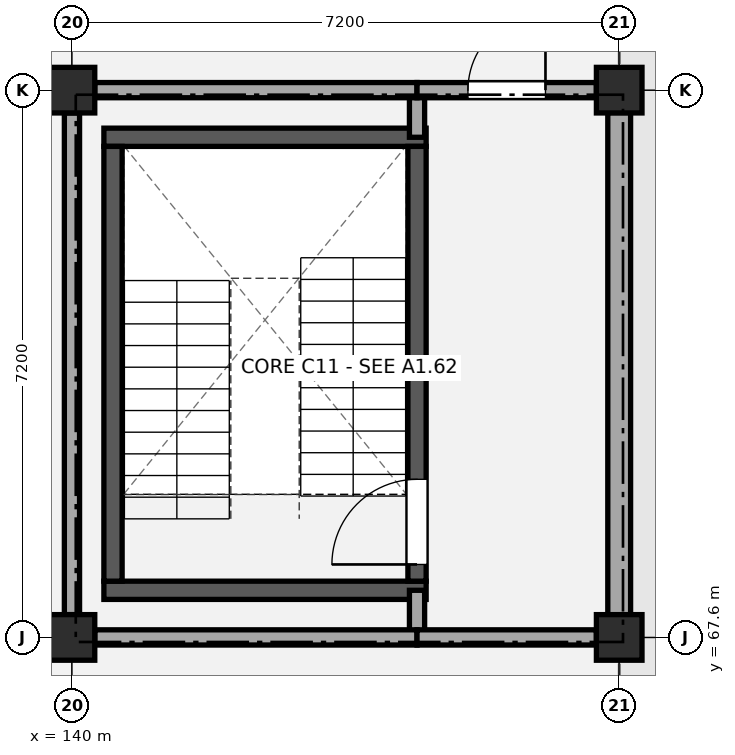
"""IFC4 building model, lengths in metres.
Left out: names, types, materials, properties, quantities, classifications, styles, units other than length and angle.
Written with IfcOpenShell. Run it as: python <this file> out.ifc"""

import sys

from ifc_helpers import new_model, si_unit, direction, frame, frame_2d, origin, origin_2d, place, context, subcontext, project, spatial, rectangle, extrude, element, fill, save


model = new_model("IFC4")
c1 = context("Model", 3, precision=1e-05, world=origin(), true_north=direction((0.0, 1.0)))
c2 = subcontext(c1, "Body", "Model", "MODEL_VIEW")
j1 = project(units=[si_unit("LENGTHUNIT", "METRE"), si_unit("PLANEANGLEUNIT", "RADIAN")], contexts=[c1])
p1 = place(None, origin())
s1 = spatial("IfcSite", under=j1, at=p1, CompositionType="ELEMENT")
p2 = place(p1, origin())
s2 = spatial("IfcBuilding", under=s1, at=p2, CompositionType="ELEMENT")
p3 = place(p2, frame((0.0, 0.0, 13.5)))
s3 = spatial("IfcBuildingStorey", under=s2, at=p3, CompositionType="ELEMENT", Elevation=13.5)
for number, where, z_axis, x_axis in (
    (1, (140.0, 67.6, 0.0), (0.0, 0.0, 1.0), (1.0, 0.0, 0.0)),
    (2, (140.0, 74.8, 0.0), (0.0, 0.0, 1.0), (1.0, 0.0, 0.0)),
    (3, (147.2, 67.6, 0.0), (0.0, 0.0, 1.0), (1.0, 0.0, 0.0)),
    (4, (147.2, 74.8, 0.0), (0.0, 0.0, 1.0), (1.0, 0.0, 0.0)),
):
    element("IfcColumn", number, at=place(p3, frame(where, z_axis=z_axis, x_axis=x_axis)), inside=s3, PredefinedType="COLUMN", context=c2, shape_type="SweptSolid", body=[
        extrude(rectangle(XDim=0.6, YDim=0.6, at=origin_2d()), origin(), (0.0, 0.0, 1.0), 4.14),
    ])
p4 = place(p3, frame((147.2, 74.505, 0.0), z_axis=(0.0, 0.0, 1.0), x_axis=(0.0, -1.0, 0.0)))
e5 = element("IfcWall", 5, at=p4, inside=s3, PredefinedType="STANDARD", context=c2, shape_type="SweptSolid", body=[
    extrude(rectangle(XDim=6.61, YDim=0.3, at=frame_2d((3.305, 0.0))), origin(), (0.0, 0.0, 1.0), 3.32),
])
for number, where, z_axis, x_axis in (
    (6, (140.42, 68.22, 0.0), (0.0, 0.0, 1.0), (1.0, 0.0, 0.0)),
    (7, (140.42, 74.18, 0.0), (0.0, 0.0, 1.0), (1.0, 0.0, 0.0)),
):
    element("IfcWall", number, at=place(p3, frame(where, z_axis=z_axis, x_axis=x_axis)), inside=s3, PredefinedType="SHEAR", context=c2, shape_type="SweptSolid", body=[
        extrude(rectangle(XDim=4.24, YDim=0.24, at=frame_2d((2.12, 0.0))), origin(), (0.0, 0.0, 1.0), 3.88),
    ])
p5 = place(p3, frame((140.54, 68.34, 0.0), z_axis=(0.0, 0.0, 1.0), x_axis=(0.0, 1.0, 0.0)))
e8 = element("IfcWall", 8, at=p5, inside=s3, PredefinedType="SHEAR", context=c2, shape_type="SweptSolid", body=[
    extrude(rectangle(XDim=5.72, YDim=0.24, at=frame_2d((2.86, 0.0))), origin(), (0.0, 0.0, 1.0), 3.88),
])
p6 = place(p3, frame((144.54, 68.34, 0.0), z_axis=(0.0, 0.0, 1.0), x_axis=(0.0, 1.0, 0.0)))
e9 = element("IfcWall", 9, at=p6, inside=s3, PredefinedType="SHEAR", context=c2, shape_type="SweptSolid", body=[
    extrude(rectangle(XDim=5.72, YDim=0.24, at=frame_2d((2.86, 0.0))), origin(), (0.0, 0.0, 1.0), 3.88),
])
p7 = place(p6, frame((0.22, 0.0, 0.0)))
e10 = element("IfcOpeningElement", 10, at=p7, cuts=e9, PredefinedType="OPENING", context=c2, shape_type="SweptSolid", body=[
    extrude(rectangle(XDim=1.12, YDim=2.15, at=frame_2d((0.56, 1.075))), frame((0.0, 0.13, 0.0), z_axis=(0.0, -1.0, 0.0), x_axis=(1.0, 0.0, 0.0)), (0.0, 0.0, 1.0), 0.26),
])
p8 = place(p3, frame((144.54, 67.6, 0.0), z_axis=(0.0, 0.0, 1.0), x_axis=(0.0, 1.0, 0.0)))
e11 = element("IfcWall", 11, at=p8, inside=s3, PredefinedType="PARTITIONING", context=c2, shape_type="SweptSolid", body=[
    extrude(rectangle(XDim=0.62, YDim=0.2, at=frame_2d((0.31, 0.0))), origin(), (0.0, 0.0, 1.0), 3.2),
])
p9 = place(p3, frame((144.54, 74.18, 0.0), z_axis=(0.0, 0.0, 1.0), x_axis=(0.0, 1.0, 0.0)))
e12 = element("IfcWall", 12, at=p9, inside=s3, PredefinedType="PARTITIONING", context=c2, shape_type="SweptSolid", body=[
    extrude(rectangle(XDim=0.62, YDim=0.2, at=frame_2d((0.31, 0.0))), origin(), (0.0, 0.0, 1.0), 3.27),
])
p10 = place(p3, frame((140.0, 67.9, 0.0), z_axis=(0.0, 0.0, 1.0), x_axis=(0.0, 1.0, 0.0)))
e13 = element("IfcWall", 13, at=p10, inside=s3, PredefinedType="PARTITIONING", context=c2, shape_type="SweptSolid", body=[
    extrude(rectangle(XDim=6.6, YDim=0.2, at=frame_2d((3.3, 0.0))), origin(), (0.0, 0.0, 1.0), 3.25),
])
p11 = place(p3, frame((140.3, 67.6, 0.0), z_axis=(0.0, 0.0, 1.0), x_axis=(1.0, 0.0, 0.0)))
e14 = element("IfcWall", 14, at=p11, inside=s3, PredefinedType="PARTITIONING", context=c2, shape_type="SweptSolid", body=[
    extrude(rectangle(XDim=4.24, YDim=0.2, at=frame_2d((2.12, 0.0))), origin(), (0.0, 0.0, 1.0), 3.2),
])
p12 = place(p3, frame((144.54, 67.6, 0.0), z_axis=(0.0, 0.0, 1.0), x_axis=(1.0, 0.0, 0.0)))
e15 = element("IfcWall", 15, at=p12, inside=s3, PredefinedType="PARTITIONING", context=c2, shape_type="SweptSolid", body=[
    extrude(rectangle(XDim=2.36, YDim=0.2, at=frame_2d((1.18, 0.0))), origin(), (0.0, 0.0, 1.0), 3.2),
])
p13 = place(p3, frame((140.3, 74.8, 0.0), z_axis=(0.0, 0.0, 1.0), x_axis=(1.0, 0.0, 0.0)))
e16 = element("IfcWall", 16, at=p13, inside=s3, PredefinedType="PARTITIONING", context=c2, shape_type="SweptSolid", body=[
    extrude(rectangle(XDim=4.24, YDim=0.2, at=frame_2d((2.12, 0.0))), origin(), (0.0, 0.0, 1.0), 3.27),
])
p14 = place(p3, frame((144.54, 74.8, 0.0), z_axis=(0.0, 0.0, 1.0), x_axis=(1.0, 0.0, 0.0)))
e17 = element("IfcWall", 17, at=p14, inside=s3, PredefinedType="PARTITIONING", context=c2, shape_type="SweptSolid", body=[
    extrude(rectangle(XDim=2.36, YDim=0.2, at=frame_2d((1.18, 0.0))), origin(), (0.0, 0.0, 1.0), 3.27),
])
p15 = place(p14, frame((0.67, 0.0, 0.0)))
e18 = element("IfcOpeningElement", 18, at=p15, cuts=e17, PredefinedType="OPENING", context=c2, shape_type="SweptSolid", body=[
    extrude(rectangle(XDim=1.02, YDim=2.15, at=frame_2d((0.51, 1.075))), frame((0.0, 0.11, 0.0), z_axis=(0.0, -1.0, 0.0), x_axis=(1.0, 0.0, 0.0)), (0.0, 0.0, 1.0), 0.22),
])
p16 = place(p7, origin())
e19 = element("IfcDoor", 19, at=p16, inside=s3, OperationType="SINGLE_SWING_LEFT", PredefinedType="DOOR", context=c2, shape_type="SweptSolid", body=[
    extrude(rectangle(XDim=1.12, YDim=2.15, at=frame_2d((0.56, 1.075))), frame((0.0, 0.025, 0.0), z_axis=(0.0, -1.0, 0.0), x_axis=(1.0, 0.0, 0.0)), (0.0, 0.0, 1.0), 0.05),
])
fill(e10, e19)
p17 = place(p15, origin())
e20 = element("IfcDoor", 20, at=p17, inside=s3, OperationType="SINGLE_SWING_RIGHT", PredefinedType="DOOR", context=c2, shape_type="SweptSolid", body=[
    extrude(rectangle(XDim=1.02, YDim=2.15, at=frame_2d((0.51, 1.075))), frame((0.0, 0.025, 0.0), z_axis=(0.0, -1.0, 0.0), x_axis=(1.0, 0.0, 0.0)), (0.0, 0.0, 1.0), 0.05),
])
fill(e18, e20)
save(model, sys.argv[1])
